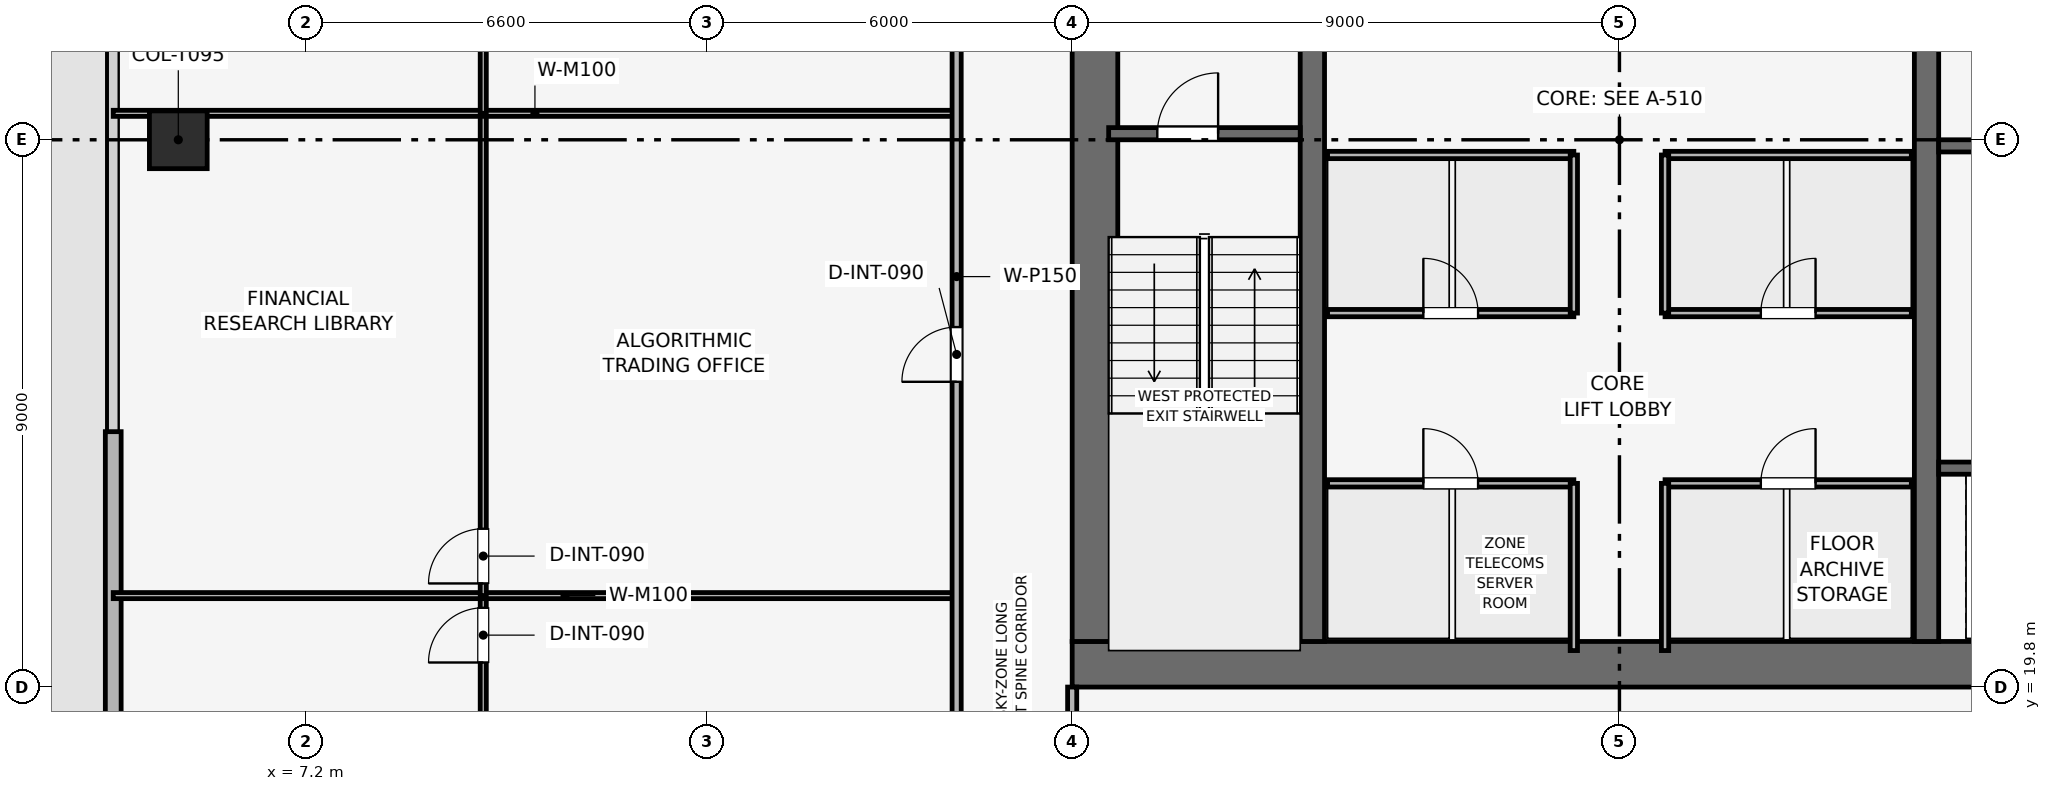
"""IFC4 building model, lengths in metres.
Left out: names, types, materials, properties, quantities, classifications, styles, units other than length and angle.
Written with IfcOpenShell. Run it as: python <this file> out.ifc"""

import sys

from ifc_helpers import new_model, si_unit, direction, frame, frame_2d, origin, origin_2d, place, context, subcontext, project, spatial, rectangle, extrude, element, fill, save


model = new_model("IFC4")
c1 = context("Model", 3, precision=1e-05, world=origin(), true_north=direction((0.0, 1.0)))
c2 = subcontext(c1, "Body", "Model", "MODEL_VIEW")
j1 = project(units=[si_unit("LENGTHUNIT", "METRE"), si_unit("PLANEANGLEUNIT", "RADIAN")], contexts=[c1])
p1 = place(None, origin())
s1 = spatial("IfcSite", under=j1, at=p1, CompositionType="ELEMENT")
p2 = place(p1, origin())
s2 = spatial("IfcBuilding", under=s1, at=p2, CompositionType="ELEMENT")
p3 = place(p2, frame((0.0, 0.0, 272.85)))
s3 = spatial("IfcBuildingStorey", under=s2, at=p3, CompositionType="ELEMENT", Elevation=272.85)
p4 = place(p3, frame((19.8, 20.175, 0.0), z_axis=(0.0, 0.0, 1.0), x_axis=(1.0, 0.0, 0.0)))
e1 = element("IfcWall", 1, at=p4, inside=s3, PredefinedType="SHEAR", context=c2, shape_type="SweptSolid", body=[
    extrude(rectangle(XDim=18.0, YDim=0.75, at=frame_2d((9.0, 0.0))), origin(), (0.0, 0.0, 1.0), 3.75),
])
p5 = place(p3, frame((20.175, 20.55, 0.0), z_axis=(0.0, 0.0, 1.0), x_axis=(0.0, 1.0, 0.0)))
e2 = element("IfcWall", 2, at=p5, inside=s3, PredefinedType="SHEAR", context=c2, shape_type="SweptSolid", body=[
    extrude(rectangle(XDim=16.5, YDim=0.75, at=frame_2d((8.25, 0.0))), origin(), (0.0, 0.0, 1.0), 3.75),
])
p6 = place(p5, frame((10.25, 0.0, 0.0)))
e3 = element("IfcOpeningElement", 3, at=p6, cuts=e2, PredefinedType="OPENING", context=c2, shape_type="SweptSolid", body=[
    extrude(rectangle(XDim=1.1, YDim=2.15, at=frame_2d((0.55, 1.075))), frame((0.0, 0.385, 0.0), z_axis=(0.0, -1.0, 0.0), x_axis=(1.0, 0.0, 0.0)), (0.0, 0.0, 1.0), 0.77),
])
for number, where, z_axis, x_axis in (
    (4, (23.75, 20.55, 0.0), (0.0, 0.0, 1.0), (0.0, 1.0, 0.0)),
    (5, (33.85, 20.55, 0.0), (0.0, 0.0, 1.0), (0.0, 1.0, 0.0)),
):
    element("IfcWall", number, at=place(p3, frame(where, z_axis=z_axis, x_axis=x_axis)), inside=s3, PredefinedType="SHEAR", context=c2, shape_type="SweptSolid", body=[
        extrude(rectangle(XDim=16.5, YDim=0.4, at=frame_2d((8.25, 0.0))), origin(), (0.0, 0.0, 1.0), 3.75),
    ])
p7 = place(p3, frame((5.1, 28.8, 0.003), z_axis=(0.0, 0.0, 1.0), x_axis=(1.0, 0.0, 0.0)))
e6 = element("IfcColumn", 6, at=p7, inside=s3, PredefinedType="COLUMN", context=c2, shape_type="SweptSolid", body=[
    extrude(rectangle(XDim=0.95, YDim=0.95, at=origin_2d()), origin(), (0.0, 0.0, 1.0), 3.494),
])
p8 = place(p3, frame((4.03, 10.8, 0.0), z_axis=(0.0, 0.0, 1.0), x_axis=(0.0, 1.0, 0.0)))
e7 = element("IfcWall", 7, at=p8, inside=s3, PredefinedType="SOLIDWALL", context=c2, shape_type="SweptSolid", body=[
    extrude(rectangle(XDim=13.2, YDim=0.26, at=frame_2d((6.6, 0.0))), origin(), (0.0, 0.0, 1.0), 3.5),
])
p9 = place(p8, frame((6.836, 0.0, 0.0)))
e8 = element("IfcOpeningElement", 8, at=p9, cuts=e7, PredefinedType="OPENING", context=c2, shape_type="SweptSolid", body=[
    extrude(rectangle(XDim=1.0, YDim=2.2, at=frame_2d((0.5, 1.1))), frame((0.0, 0.14, 0.0), z_axis=(0.0, -1.0, 0.0), x_axis=(1.0, 0.0, 0.0)), (0.0, 0.0, 1.0), 0.28),
])
p10 = place(p3, frame((20.4, 28.9, 0.0), z_axis=(0.0, 0.0, 1.0), x_axis=(1.0, 0.0, 0.0)))
e9 = element("IfcWall", 9, at=p10, inside=s3, PredefinedType="SHEAR", context=c2, shape_type="SweptSolid", body=[
    extrude(rectangle(XDim=3.15, YDim=0.2, at=frame_2d((1.575, 0.0))), origin(), (0.0, 0.0, 1.0), 3.5),
])
p11 = place(p10, frame((0.8, 0.0, 0.0)))
e10 = element("IfcOpeningElement", 10, at=p11, cuts=e9, PredefinedType="OPENING", context=c2, shape_type="SweptSolid", body=[
    extrude(rectangle(XDim=1.0, YDim=2.1, at=frame_2d((0.5, 1.05))), frame((0.0, 0.11, 0.0), z_axis=(0.0, -1.0, 0.0), x_axis=(1.0, 0.0, 0.0)), (0.0, 0.0, 1.0), 0.22),
])
p12 = place(p3, frame((34.05, 28.7, 0.0), z_axis=(0.0, 0.0, 1.0), x_axis=(1.0, 0.0, 0.0)))
e11 = element("IfcWall", 11, at=p12, inside=s3, PredefinedType="SHEAR", context=c2, shape_type="SweptSolid", body=[
    extrude(rectangle(XDim=3.15, YDim=0.2, at=frame_2d((1.575, 0.0))), origin(), (0.0, 0.0, 1.0), 3.5),
])
p13 = place(p12, frame((0.8, 0.0, 0.0)))
e12 = element("IfcOpeningElement", 12, at=p13, cuts=e11, PredefinedType="OPENING", context=c2, shape_type="SweptSolid", body=[
    extrude(rectangle(XDim=1.0, YDim=2.1, at=frame_2d((0.5, 1.05))), frame((0.0, 0.11, 0.0), z_axis=(0.0, -1.0, 0.0), x_axis=(1.0, 0.0, 0.0)), (0.0, 0.0, 1.0), 0.22),
])
p14 = place(p3, frame((34.05, 23.4, 0.0), z_axis=(0.0, 0.0, 1.0), x_axis=(1.0, 0.0, 0.0)))
e13 = element("IfcWall", 13, at=p14, inside=s3, PredefinedType="SHEAR", context=c2, shape_type="SweptSolid", body=[
    extrude(rectangle(XDim=3.05, YDim=0.2, at=frame_2d((1.525, 0.0))), origin(), (0.0, 0.0, 1.0), 3.5),
])
p15 = place(p14, frame((1.2, 0.0, 0.0)))
e14 = element("IfcOpeningElement", 14, at=p15, cuts=e13, PredefinedType="OPENING", context=c2, shape_type="SweptSolid", body=[
    extrude(rectangle(XDim=1.1, YDim=2.15, at=frame_2d((0.55, 1.075))), frame((0.0, 0.11, 0.0), z_axis=(0.0, -1.0, 0.0), x_axis=(1.0, 0.0, 0.0)), (0.0, 0.0, 1.0), 0.22),
])
p16 = place(p3, frame((24.0, 23.15, 0.0), z_axis=(0.0, 0.0, 1.0), x_axis=(1.0, 0.0, 0.0)))
e15 = element("IfcWall", 15, at=p16, inside=s3, PredefinedType="PARTITIONING", context=c2, shape_type="SweptSolid", body=[
    extrude(rectangle(XDim=4.05, YDim=0.12, at=frame_2d((2.025, 0.0))), origin(), (0.0, 0.0, 1.0), 3.5),
])
p17 = place(p16, frame((1.575, 0.0, 0.0)))
e16 = element("IfcOpeningElement", 16, at=p17, cuts=e15, PredefinedType="OPENING", context=c2, shape_type="SweptSolid", body=[
    extrude(rectangle(XDim=0.9, YDim=2.1, at=frame_2d((0.45, 1.05))), frame((0.0, 0.07, 0.0), z_axis=(0.0, -1.0, 0.0), x_axis=(1.0, 0.0, 0.0)), (0.0, 0.0, 1.0), 0.14),
])
p18 = place(p3, frame((28.05, 20.4, 0.0), z_axis=(0.0, 0.0, 1.0), x_axis=(0.0, 1.0, 0.0)))
e17 = element("IfcWall", 17, at=p18, inside=s3, PredefinedType="PARTITIONING", context=c2, shape_type="SweptSolid", body=[
    extrude(rectangle(XDim=2.75, YDim=0.12, at=frame_2d((1.375, 0.0))), origin(), (0.0, 0.0, 1.0), 3.5),
])
p19 = place(p3, frame((29.55, 23.15, 0.0), z_axis=(0.0, 0.0, 1.0), x_axis=(1.0, 0.0, 0.0)))
e18 = element("IfcWall", 18, at=p19, inside=s3, PredefinedType="PARTITIONING", context=c2, shape_type="SweptSolid", body=[
    extrude(rectangle(XDim=4.05, YDim=0.12, at=frame_2d((2.025, 0.0))), origin(), (0.0, 0.0, 1.0), 3.5),
])
p20 = place(p19, frame((1.575, 0.0, 0.0)))
e19 = element("IfcOpeningElement", 19, at=p20, cuts=e18, PredefinedType="OPENING", context=c2, shape_type="SweptSolid", body=[
    extrude(rectangle(XDim=0.9, YDim=2.1, at=frame_2d((0.45, 1.05))), frame((0.0, 0.07, 0.0), z_axis=(0.0, -1.0, 0.0), x_axis=(1.0, 0.0, 0.0)), (0.0, 0.0, 1.0), 0.14),
])
p21 = place(p3, frame((29.55, 20.4, 0.0), z_axis=(0.0, 0.0, 1.0), x_axis=(0.0, 1.0, 0.0)))
e20 = element("IfcWall", 20, at=p21, inside=s3, PredefinedType="PARTITIONING", context=c2, shape_type="SweptSolid", body=[
    extrude(rectangle(XDim=2.75, YDim=0.12, at=frame_2d((1.375, 0.0))), origin(), (0.0, 0.0, 1.0), 3.5),
])
p22 = place(p3, frame((24.0, 25.95, 0.0), z_axis=(0.0, 0.0, 1.0), x_axis=(1.0, 0.0, 0.0)))
e21 = element("IfcWall", 21, at=p22, inside=s3, PredefinedType="PARTITIONING", context=c2, shape_type="SweptSolid", body=[
    extrude(rectangle(XDim=4.05, YDim=0.12, at=frame_2d((2.025, 0.0))), origin(), (0.0, 0.0, 1.0), 3.5),
])
p23 = place(p22, frame((1.575, 0.0, 0.0)))
e22 = element("IfcOpeningElement", 22, at=p23, cuts=e21, PredefinedType="OPENING", context=c2, shape_type="SweptSolid", body=[
    extrude(rectangle(XDim=0.9, YDim=2.1, at=frame_2d((0.45, 1.05))), frame((0.0, 0.07, 0.0), z_axis=(0.0, -1.0, 0.0), x_axis=(1.0, 0.0, 0.0)), (0.0, 0.0, 1.0), 0.14),
])
p24 = place(p3, frame((24.0, 28.55, 0.0), z_axis=(0.0, 0.0, 1.0), x_axis=(1.0, 0.0, 0.0)))
e23 = element("IfcWall", 23, at=p24, inside=s3, PredefinedType="PARTITIONING", context=c2, shape_type="SweptSolid", body=[
    extrude(rectangle(XDim=4.05, YDim=0.12, at=frame_2d((2.025, 0.0))), origin(), (0.0, 0.0, 1.0), 3.5),
])
p25 = place(p3, frame((28.05, 25.95, 0.0), z_axis=(0.0, 0.0, 1.0), x_axis=(0.0, 1.0, 0.0)))
e24 = element("IfcWall", 24, at=p25, inside=s3, PredefinedType="PARTITIONING", context=c2, shape_type="SweptSolid", body=[
    extrude(rectangle(XDim=2.6, YDim=0.12, at=frame_2d((1.3, 0.0))), origin(), (0.0, 0.0, 1.0), 3.5),
])
p26 = place(p3, frame((29.55, 25.95, 0.0), z_axis=(0.0, 0.0, 1.0), x_axis=(1.0, 0.0, 0.0)))
e25 = element("IfcWall", 25, at=p26, inside=s3, PredefinedType="PARTITIONING", context=c2, shape_type="SweptSolid", body=[
    extrude(rectangle(XDim=4.05, YDim=0.12, at=frame_2d((2.025, 0.0))), origin(), (0.0, 0.0, 1.0), 3.5),
])
p27 = place(p26, frame((1.575, 0.0, 0.0)))
e26 = element("IfcOpeningElement", 26, at=p27, cuts=e25, PredefinedType="OPENING", context=c2, shape_type="SweptSolid", body=[
    extrude(rectangle(XDim=0.9, YDim=2.1, at=frame_2d((0.45, 1.05))), frame((0.0, 0.07, 0.0), z_axis=(0.0, -1.0, 0.0), x_axis=(1.0, 0.0, 0.0)), (0.0, 0.0, 1.0), 0.14),
])
p28 = place(p3, frame((29.55, 28.55, 0.0), z_axis=(0.0, 0.0, 1.0), x_axis=(1.0, 0.0, 0.0)))
e27 = element("IfcWall", 27, at=p28, inside=s3, PredefinedType="PARTITIONING", context=c2, shape_type="SweptSolid", body=[
    extrude(rectangle(XDim=4.05, YDim=0.12, at=frame_2d((2.025, 0.0))), origin(), (0.0, 0.0, 1.0), 3.5),
])
p29 = place(p3, frame((29.55, 25.95, 0.0), z_axis=(0.0, 0.0, 1.0), x_axis=(0.0, 1.0, 0.0)))
e28 = element("IfcWall", 28, at=p29, inside=s3, PredefinedType="PARTITIONING", context=c2, shape_type="SweptSolid", body=[
    extrude(rectangle(XDim=2.6, YDim=0.12, at=frame_2d((1.3, 0.0))), origin(), (0.0, 0.0, 1.0), 3.5),
])
p30 = place(p3, frame((10.115, 13.1, 0.0), z_axis=(0.0, 0.0, 1.0), x_axis=(0.0, 1.0, 0.0)))
e29 = element("IfcWall", 29, at=p30, inside=s3, PredefinedType="MOVABLE", context=c2, shape_type="SweptSolid", body=[
    extrude(rectangle(XDim=8.204, YDim=0.1, at=frame_2d((4.102, 0.0))), origin(), (0.0, 0.0, 1.0), 3.085),
])
p31 = place(p30, frame((7.104, 0.0, 0.0)))
e30 = element("IfcOpeningElement", 30, at=p31, cuts=e29, PredefinedType="OPENING", context=c2, shape_type="SweptSolid", body=[
    extrude(rectangle(XDim=0.9, YDim=2.1, at=frame_2d((0.45, 1.05))), frame((0.0, 0.06, 0.0), z_axis=(0.0, -1.0, 0.0), x_axis=(1.0, 0.0, 0.0)), (0.0, 0.0, 1.0), 0.12),
])
p32 = place(p3, frame((4.03, 21.304, 0.0), z_axis=(0.0, 0.0, 1.0), x_axis=(1.0, 0.0, 0.0)))
e31 = element("IfcWall", 31, at=p32, inside=s3, PredefinedType="MOVABLE", context=c2, shape_type="SweptSolid", body=[
    extrude(rectangle(XDim=13.87, YDim=0.1, at=frame_2d((6.935, 0.0))), origin(), (0.0, 0.0, 1.0), 3.085),
])
p33 = place(p3, frame((10.115, 21.304, 0.0), z_axis=(0.0, 0.0, 1.0), x_axis=(0.0, 1.0, 0.0)))
e32 = element("IfcWall", 32, at=p33, inside=s3, PredefinedType="MOVABLE", context=c2, shape_type="SweptSolid", body=[
    extrude(rectangle(XDim=7.931, YDim=0.1, at=frame_2d((3.966, 0.0))), origin(), (0.0, 0.0, 1.0), 3.085),
])
p34 = place(p33, frame((0.2, 0.0, 0.0)))
e33 = element("IfcOpeningElement", 33, at=p34, cuts=e32, PredefinedType="OPENING", context=c2, shape_type="SweptSolid", body=[
    extrude(rectangle(XDim=0.9, YDim=2.1, at=frame_2d((0.45, 1.05))), frame((0.0, 0.06, 0.0), z_axis=(0.0, -1.0, 0.0), x_axis=(1.0, 0.0, 0.0)), (0.0, 0.0, 1.0), 0.12),
])
p35 = place(p3, frame((4.03, 29.235, 0.0), z_axis=(0.0, 0.0, 1.0), x_axis=(1.0, 0.0, 0.0)))
e34 = element("IfcWall", 34, at=p35, inside=s3, PredefinedType="MOVABLE", context=c2, shape_type="SweptSolid", body=[
    extrude(rectangle(XDim=13.87, YDim=0.1, at=frame_2d((6.935, 0.0))), origin(), (0.0, 0.0, 1.0), 3.085),
])
p36 = place(p3, frame((10.115, 29.235, 0.0), z_axis=(0.0, 0.0, 1.0), x_axis=(0.0, 1.0, 0.0)))
e35 = element("IfcWall", 35, at=p36, inside=s3, PredefinedType="MOVABLE", context=c2, shape_type="SweptSolid", body=[
    extrude(rectangle(XDim=10.465, YDim=0.1, at=frame_2d((5.232, 0.0))), origin(), (0.0, 0.0, 1.0), 3.085),
])
p37 = place(p36, frame((5.928, 0.0, 0.0)))
e36 = element("IfcOpeningElement", 36, at=p37, cuts=e35, PredefinedType="OPENING", context=c2, shape_type="SweptSolid", body=[
    extrude(rectangle(XDim=0.9, YDim=2.1, at=frame_2d((0.45, 1.05))), frame((0.0, 0.06, 0.0), z_axis=(0.0, -1.0, 0.0), x_axis=(1.0, 0.0, 0.0)), (0.0, 0.0, 1.0), 0.12),
])
p38 = place(p3, frame((19.8, 4.03, 0.0), z_axis=(0.0, 0.0, 1.0), x_axis=(0.0, 1.0, 0.0)))
e37 = element("IfcWall", 37, at=p38, inside=s3, PredefinedType="PARTITIONING", context=c2, shape_type="SweptSolid", body=[
    extrude(rectangle(XDim=15.77, YDim=0.15, at=frame_2d((7.885, 0.0))), origin(), (0.0, 0.0, 1.0), 3.085),
])
p39 = place(p38, frame((10.82, 0.0, 0.0)))
e38 = element("IfcOpeningElement", 38, at=p39, cuts=e37, PredefinedType="OPENING", context=c2, shape_type="SweptSolid", body=[
    extrude(rectangle(XDim=0.9, YDim=2.1, at=frame_2d((0.45, 1.05))), frame((0.0, 0.085, 0.0), z_axis=(0.0, -1.0, 0.0), x_axis=(1.0, 0.0, 0.0)), (0.0, 0.0, 1.0), 0.17),
])
p40 = place(p3, frame((17.9, 10.8, 0.0), z_axis=(0.0, 0.0, 1.0), x_axis=(0.0, 1.0, 0.0)))
e39 = element("IfcWall", 39, at=p40, inside=s3, PredefinedType="PARTITIONING", context=c2, shape_type="SweptSolid", body=[
    extrude(rectangle(XDim=28.9, YDim=0.15, at=frame_2d((14.45, 0.0))), origin(), (0.0, 0.0, 1.0), 3.085),
])
p41 = place(p40, frame((0.7, 0.0, 0.0)))
e40 = element("IfcOpeningElement", 40, at=p41, cuts=e39, PredefinedType="OPENING", context=c2, shape_type="SweptSolid", body=[
    extrude(rectangle(XDim=0.9, YDim=2.1, at=frame_2d((0.45, 1.05))), frame((0.0, 0.085, 0.0), z_axis=(0.0, -1.0, 0.0), x_axis=(1.0, 0.0, 0.0)), (0.0, 0.0, 1.0), 0.17),
])
p42 = place(p40, frame((5.952, 0.0, 0.0)))
e41 = element("IfcOpeningElement", 41, at=p42, cuts=e39, PredefinedType="OPENING", context=c2, shape_type="SweptSolid", body=[
    extrude(rectangle(XDim=0.9, YDim=2.1, at=frame_2d((0.45, 1.05))), frame((0.0, 0.085, 0.0), z_axis=(0.0, -1.0, 0.0), x_axis=(1.0, 0.0, 0.0)), (0.0, 0.0, 1.0), 0.17),
])
p43 = place(p40, frame((14.02, 0.0, 0.0)))
e42 = element("IfcOpeningElement", 42, at=p43, cuts=e39, PredefinedType="OPENING", context=c2, shape_type="SweptSolid", body=[
    extrude(rectangle(XDim=0.9, YDim=2.1, at=frame_2d((0.45, 1.05))), frame((0.0, 0.085, 0.0), z_axis=(0.0, -1.0, 0.0), x_axis=(1.0, 0.0, 0.0)), (0.0, 0.0, 1.0), 0.17),
])
p44 = place(p40, frame((23.217, 0.0, 0.0)))
e43 = element("IfcOpeningElement", 43, at=p44, cuts=e39, PredefinedType="OPENING", context=c2, shape_type="SweptSolid", body=[
    extrude(rectangle(XDim=0.9, YDim=2.1, at=frame_2d((0.45, 1.05))), frame((0.0, 0.085, 0.0), z_axis=(0.0, -1.0, 0.0), x_axis=(1.0, 0.0, 0.0)), (0.0, 0.0, 1.0), 0.17),
])
p45 = place(p11, origin())
e44 = element("IfcDoor", 44, at=p45, inside=s3, OperationType="SINGLE_SWING_RIGHT", PredefinedType="DOOR", context=c2, shape_type="SweptSolid", body=[
    extrude(rectangle(XDim=1.0, YDim=2.1, at=frame_2d((0.5, 1.05))), frame((0.0, 0.025, 0.0), z_axis=(0.0, -1.0, 0.0), x_axis=(1.0, 0.0, 0.0)), (0.0, 0.0, 1.0), 0.05),
])
fill(e10, e44)
p46 = place(p17, origin())
e45 = element("IfcDoor", 45, at=p46, inside=s3, OperationType="SINGLE_SWING_LEFT", PredefinedType="DOOR", context=c2, shape_type="SweptSolid", body=[
    extrude(rectangle(XDim=0.9, YDim=2.1, at=frame_2d((0.45, 1.05))), frame((0.0, 0.025, 0.0), z_axis=(0.0, -1.0, 0.0), x_axis=(1.0, 0.0, 0.0)), (0.0, 0.0, 1.0), 0.05),
])
fill(e16, e45)
p47 = place(p20, origin())
e46 = element("IfcDoor", 46, at=p47, inside=s3, OperationType="SINGLE_SWING_RIGHT", PredefinedType="DOOR", context=c2, shape_type="SweptSolid", body=[
    extrude(rectangle(XDim=0.9, YDim=2.1, at=frame_2d((0.45, 1.05))), frame((0.0, 0.025, 0.0), z_axis=(0.0, -1.0, 0.0), x_axis=(1.0, 0.0, 0.0)), (0.0, 0.0, 1.0), 0.05),
])
fill(e19, e46)
p48 = place(p23, origin())
e47 = element("IfcDoor", 47, at=p48, inside=s3, OperationType="SINGLE_SWING_LEFT", PredefinedType="DOOR", context=c2, shape_type="SweptSolid", body=[
    extrude(rectangle(XDim=0.9, YDim=2.1, at=frame_2d((0.45, 1.05))), frame((0.0, 0.025, 0.0), z_axis=(0.0, -1.0, 0.0), x_axis=(1.0, 0.0, 0.0)), (0.0, 0.0, 1.0), 0.05),
])
fill(e22, e47)
p49 = place(p27, origin())
e48 = element("IfcDoor", 48, at=p49, inside=s3, OperationType="SINGLE_SWING_RIGHT", PredefinedType="DOOR", context=c2, shape_type="SweptSolid", body=[
    extrude(rectangle(XDim=0.9, YDim=2.1, at=frame_2d((0.45, 1.05))), frame((0.0, 0.025, 0.0), z_axis=(0.0, -1.0, 0.0), x_axis=(1.0, 0.0, 0.0)), (0.0, 0.0, 1.0), 0.05),
])
fill(e26, e48)
p50 = place(p31, origin())
e49 = element("IfcDoor", 49, at=p50, inside=s3, OperationType="SINGLE_SWING_LEFT", PredefinedType="DOOR", context=c2, shape_type="SweptSolid", body=[
    extrude(rectangle(XDim=0.9, YDim=2.1, at=frame_2d((0.45, 1.05))), frame((0.0, 0.025, 0.0), z_axis=(0.0, -1.0, 0.0), x_axis=(1.0, 0.0, 0.0)), (0.0, 0.0, 1.0), 0.05),
])
fill(e30, e49)
p51 = place(p34, origin())
e50 = element("IfcDoor", 50, at=p51, inside=s3, OperationType="SINGLE_SWING_LEFT", PredefinedType="DOOR", context=c2, shape_type="SweptSolid", body=[
    extrude(rectangle(XDim=0.9, YDim=2.1, at=frame_2d((0.45, 1.05))), frame((0.0, 0.025, 0.0), z_axis=(0.0, -1.0, 0.0), x_axis=(1.0, 0.0, 0.0)), (0.0, 0.0, 1.0), 0.05),
])
fill(e33, e50)
p52 = place(p43, origin())
e51 = element("IfcDoor", 51, at=p52, inside=s3, OperationType="SINGLE_SWING_LEFT", PredefinedType="DOOR", context=c2, shape_type="SweptSolid", body=[
    extrude(rectangle(XDim=0.9, YDim=2.1, at=frame_2d((0.45, 1.05))), frame((0.0, 0.025, 0.0), z_axis=(0.0, -1.0, 0.0), x_axis=(1.0, 0.0, 0.0)), (0.0, 0.0, 1.0), 0.05),
])
fill(e42, e51)
save(model, sys.argv[1])
